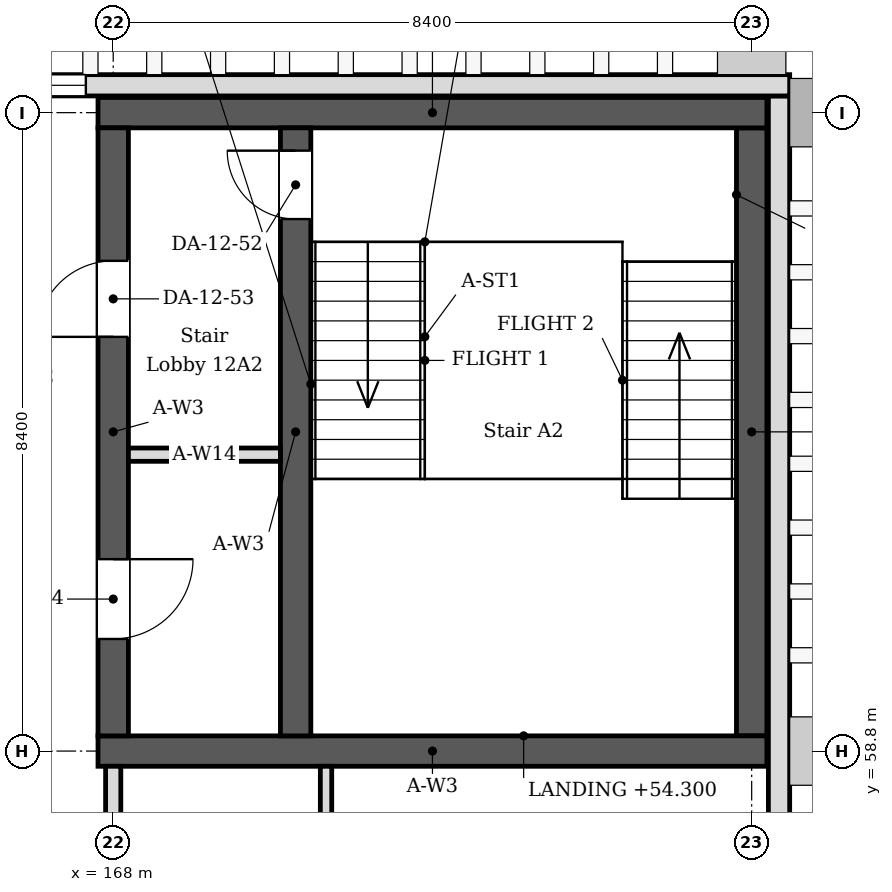
"""IFC4 building model, lengths in metres.
Left out: names, types, materials, properties, quantities, classifications, styles, units other than length and angle.
Written with IfcOpenShell. Run it as: python <this file> out.ifc"""

import sys

from ifc_helpers import new_model, si_unit, direction, frame, frame_2d, origin, place, context, subcontext, project, spatial, rectangle, extrude, element, fill, save


model = new_model("IFC4")
c1 = context("Model", 3, precision=1e-05, world=origin(), true_north=direction((0.0, 1.0)))
c2 = subcontext(c1, "Body", "Model", "MODEL_VIEW")
j1 = project(units=[si_unit("LENGTHUNIT", "METRE"), si_unit("PLANEANGLEUNIT", "RADIAN")], contexts=[c1])
p1 = place(None, origin())
s1 = spatial("IfcSite", under=j1, at=p1, CompositionType="ELEMENT")
p2 = place(p1, origin())
s2 = spatial("IfcBuilding", under=s1, at=p2, CompositionType="ELEMENT")
p3 = place(p2, frame((0.0, 0.0, 52.2)))
s3 = spatial("IfcBuildingStorey", under=s2, at=p3, CompositionType="ELEMENT", Elevation=52.2)
for number, where, z_axis, x_axis in (
    (1, (167.8, 58.8, 0.0), (0.0, 0.0, 1.0), (1.0, 0.0, 0.0)),
    (2, (167.8, 67.2, 0.0), (0.0, 0.0, 1.0), (1.0, 0.0, 0.0)),
):
    element("IfcWall", number, at=place(p3, frame(where, z_axis=z_axis, x_axis=x_axis)), inside=s3, PredefinedType="SOLIDWALL", context=c2, shape_type="SweptSolid", body=[
        extrude(rectangle(XDim=8.8, YDim=0.4, at=frame_2d((4.4, 0.0))), origin(), (0.0, 0.0, 1.0), 4.05),
    ])
p4 = place(p3, frame((168.0, 59.0, 0.0), z_axis=(0.0, 0.0, 1.0), x_axis=(0.0, 1.0, 0.0)))
e3 = element("IfcWall", 3, at=p4, inside=s3, PredefinedType="SOLIDWALL", context=c2, shape_type="SweptSolid", body=[
    extrude(rectangle(XDim=8.0, YDim=0.4, at=frame_2d((4.0, 0.0))), origin(), (0.0, 0.0, 1.0), 4.05),
])
p5 = place(p4, frame((5.25, 0.0, 0.0)))
e4 = element("IfcOpeningElement", 4, at=p5, cuts=e3, PredefinedType="OPENING", context=c2, shape_type="SweptSolid", body=[
    extrude(rectangle(XDim=1.0, YDim=2.1, at=frame_2d((0.5, 1.05))), frame((0.0, 0.21, 0.0), z_axis=(0.0, -1.0, 0.0), x_axis=(1.0, 0.0, 0.0)), (0.0, 0.0, 1.0), 0.42),
])
p6 = place(p4, frame((1.275, 0.0, 0.0)))
e5 = element("IfcOpeningElement", 5, at=p6, cuts=e3, PredefinedType="OPENING", context=c2, shape_type="SweptSolid", body=[
    extrude(rectangle(XDim=1.05, YDim=2.1, at=frame_2d((0.525, 1.05))), frame((0.0, 0.21, 0.0), z_axis=(0.0, -1.0, 0.0), x_axis=(1.0, 0.0, 0.0)), (0.0, 0.0, 1.0), 0.42),
])
p7 = place(p3, frame((176.4, 59.0, 0.0), z_axis=(0.0, 0.0, 1.0), x_axis=(0.0, 1.0, 0.0)))
e6 = element("IfcWall", 6, at=p7, inside=s3, PredefinedType="SOLIDWALL", context=c2, shape_type="SweptSolid", body=[
    extrude(rectangle(XDim=8.0, YDim=0.4, at=frame_2d((4.0, 0.0))), origin(), (0.0, 0.0, 1.0), 4.05),
])
p8 = place(p3, frame((176.76, 24.85, 0.0), z_axis=(0.0, 0.0, 1.0), x_axis=(0.0, 1.0, 0.0)))
e7 = element("IfcWall", 7, at=p8, inside=s3, PredefinedType="SOLIDWALL", context=c2, shape_type="SweptSolid", body=[
    extrude(rectangle(XDim=42.57, YDim=0.28, at=frame_2d((21.285, 0.0))), origin(), (0.0, 0.0, 1.0), 4.05),
])
p9 = place(p8, frame((17.99, 0.0, 0.6)))
e8 = element("IfcOpeningElement", 8, at=p9, cuts=e7, PredefinedType="OPENING", context=c2, shape_type="SweptSolid", body=[
    extrude(rectangle(XDim=2.52, YDim=2.4, at=frame_2d((1.26, 1.2))), frame((0.0, 0.15, 0.0), z_axis=(0.0, -1.0, 0.0), x_axis=(1.0, 0.0, 0.0)), (0.0, 0.0, 1.0), 0.3),
])
p10 = place(p8, frame((22.19, 0.0, 0.6)))
e9 = element("IfcOpeningElement", 9, at=p10, cuts=e7, PredefinedType="OPENING", context=c2, shape_type="SweptSolid", body=[
    extrude(rectangle(XDim=2.52, YDim=2.4, at=frame_2d((1.26, 1.2))), frame((0.0, 0.15, 0.0), z_axis=(0.0, -1.0, 0.0), x_axis=(1.0, 0.0, 0.0)), (0.0, 0.0, 1.0), 0.3),
])
p11 = place(p8, frame((25.97, 0.0, 0.6)))
e10 = element("IfcOpeningElement", 10, at=p11, cuts=e7, PredefinedType="OPENING", context=c2, shape_type="SweptSolid", body=[
    extrude(rectangle(XDim=2.52, YDim=2.4, at=frame_2d((1.26, 1.2))), frame((0.0, 0.15, 0.0), z_axis=(0.0, -1.0, 0.0), x_axis=(1.0, 0.0, 0.0)), (0.0, 0.0, 1.0), 0.3),
])
p12 = place(p8, frame((30.17, 0.0, 0.45)))
e11 = element("IfcOpeningElement", 11, at=p12, cuts=e7, PredefinedType="OPENING", context=c2, shape_type="SweptSolid", body=[
    extrude(rectangle(XDim=2.52, YDim=2.1, at=frame_2d((1.26, 1.05))), frame((0.0, 0.15, 0.0), z_axis=(0.0, -1.0, 0.0), x_axis=(1.0, 0.0, 0.0)), (0.0, 0.0, 1.0), 0.3),
])
p13 = place(p3, frame((156.7, 67.56, 0.0), z_axis=(0.0, 0.0, 1.0), x_axis=(1.0, 0.0, 0.0)))
e12 = element("IfcWall", 12, at=p13, inside=s3, PredefinedType="SOLIDWALL", context=c2, shape_type="SweptSolid", body=[
    extrude(rectangle(XDim=20.2, YDim=0.28, at=frame_2d((10.1, 0.0))), origin(), (0.0, 0.0, 1.0), 4.05),
])
p14 = place(p13, frame((9.26, 0.0, 0.6)))
e13 = element("IfcOpeningElement", 13, at=p14, cuts=e12, PredefinedType="OPENING", context=c2, shape_type="SweptSolid", body=[
    extrude(rectangle(XDim=1.68, YDim=2.4, at=frame_2d((0.84, 1.2))), frame((0.0, 0.15, 0.0), z_axis=(0.0, -1.0, 0.0), x_axis=(1.0, 0.0, 0.0)), (0.0, 0.0, 1.0), 0.3),
])
p15 = place(p13, frame((3.34, 0.0, 0.6)))
e14 = element("IfcOpeningElement", 14, at=p15, cuts=e12, PredefinedType="OPENING", context=c2, shape_type="SweptSolid", body=[
    extrude(rectangle(XDim=2.52, YDim=2.4, at=frame_2d((1.26, 1.2))), frame((0.0, 0.15, 0.0), z_axis=(0.0, -1.0, 0.0), x_axis=(1.0, 0.0, 0.0)), (0.0, 0.0, 1.0), 0.3),
])
p16 = place(p3, frame((170.8, 56.0, 0.0), z_axis=(0.0, 0.0, 1.0), x_axis=(0.0, 1.0, 0.0)))
e15 = element("IfcWall", 15, at=p16, inside=s3, PredefinedType="PARTITIONING", context=c2, shape_type="SweptSolid", body=[
    extrude(rectangle(XDim=2.6, YDim=0.15, at=frame_2d((1.3, 0.0))), origin(), (0.0, 0.0, 1.0), 4.05),
])
p17 = place(p3, frame((168.0, 50.55, 0.0), z_axis=(0.0, 0.0, 1.0), x_axis=(0.0, 1.0, 0.0)))
e16 = element("IfcWall", 16, at=p17, inside=s3, PredefinedType="PARTITIONING", context=c2, shape_type="SweptSolid", body=[
    extrude(rectangle(XDim=8.05, YDim=0.2, at=frame_2d((4.025, 0.0))), origin(), (0.0, 0.0, 1.0), 3.45),
])
p18 = place(p17, frame((2.08, 0.0, 0.0)))
e17 = element("IfcOpeningElement", 17, at=p18, cuts=e16, PredefinedType="OPENING", context=c2, shape_type="SweptSolid", body=[
    extrude(rectangle(XDim=0.9, YDim=2.1, at=frame_2d((0.45, 1.05))), frame((0.0, 0.11, 0.0), z_axis=(0.0, -1.0, 0.0), x_axis=(1.0, 0.0, 0.0)), (0.0, 0.0, 1.0), 0.22),
])
p19 = place(p17, frame((3.755, 0.0, 0.0)))
e18 = element("IfcOpeningElement", 18, at=p19, cuts=e16, PredefinedType="OPENING", context=c2, shape_type="SweptSolid", body=[
    extrude(rectangle(XDim=1.15, YDim=2.1, at=frame_2d((0.575, 1.05))), frame((0.0, 0.11, 0.0), z_axis=(0.0, -1.0, 0.0), x_axis=(1.0, 0.0, 0.0)), (0.0, 0.0, 1.0), 0.22),
])
p20 = place(p3, frame((170.4, 59.0, 0.0), z_axis=(0.0, 0.0, 1.0), x_axis=(0.0, 1.0, 0.0)))
e19 = element("IfcWall", 19, at=p20, inside=s3, PredefinedType="SOLIDWALL", context=c2, shape_type="SweptSolid", body=[
    extrude(rectangle(XDim=8.0, YDim=0.4, at=frame_2d((4.0, 0.0))), origin(), (0.0, 0.0, 1.0), 4.05),
])
p21 = place(p20, frame((6.8, 0.0, 0.0)))
e20 = element("IfcOpeningElement", 20, at=p21, cuts=e19, PredefinedType="OPENING", context=c2, shape_type="SweptSolid", body=[
    extrude(rectangle(XDim=0.9, YDim=2.1, at=frame_2d((0.45, 1.05))), frame((0.0, 0.21, 0.0), z_axis=(0.0, -1.0, 0.0), x_axis=(1.0, 0.0, 0.0)), (0.0, 0.0, 1.0), 0.42),
])
p22 = place(p3, frame((168.2, 62.7, 0.0), z_axis=(0.0, 0.0, 1.0), x_axis=(1.0, 0.0, 0.0)))
e21 = element("IfcWall", 21, at=p22, inside=s3, PredefinedType="PARTITIONING", context=c2, shape_type="SweptSolid", body=[
    extrude(rectangle(XDim=2.0, YDim=0.175, at=frame_2d((1.0, 0.0))), origin(), (0.0, 0.0, 1.0), 4.05),
])
p23 = place(p14, origin())
e22 = element("IfcWindow", 22, at=p23, inside=s3, PartitioningType="SINGLE_PANEL", PredefinedType="WINDOW", context=c2, shape_type="SweptSolid", body=[
    extrude(rectangle(XDim=1.68, YDim=2.4, at=frame_2d((0.84, 1.2))), frame((0.0, 0.03, 0.0), z_axis=(0.0, -1.0, 0.0), x_axis=(1.0, 0.0, 0.0)), (0.0, 0.0, 1.0), 0.06),
])
fill(e13, e22)
p24 = place(p21, origin())
e23 = element("IfcDoor", 23, at=p24, inside=s3, OperationType="SINGLE_SWING_RIGHT", PredefinedType="DOOR", context=c2, shape_type="SweptSolid", body=[
    extrude(rectangle(XDim=0.9, YDim=2.1, at=frame_2d((0.45, 1.05))), frame((0.0, 0.025, 0.0), z_axis=(0.0, -1.0, 0.0), x_axis=(1.0, 0.0, 0.0)), (0.0, 0.0, 1.0), 0.05),
])
fill(e20, e23)
p25 = place(p5, origin())
e24 = element("IfcDoor", 24, at=p25, inside=s3, OperationType="SINGLE_SWING_LEFT", PredefinedType="DOOR", context=c2, shape_type="SweptSolid", body=[
    extrude(rectangle(XDim=1.0, YDim=2.1, at=frame_2d((0.5, 1.05))), frame((0.0, 0.025, 0.0), z_axis=(0.0, -1.0, 0.0), x_axis=(1.0, 0.0, 0.0)), (0.0, 0.0, 1.0), 0.05),
])
fill(e4, e24)
p26 = place(p6, origin())
e25 = element("IfcDoor", 25, at=p26, inside=s3, OperationType="SINGLE_SWING_RIGHT", PredefinedType="DOOR", context=c2, shape_type="SweptSolid", body=[
    extrude(rectangle(XDim=1.05, YDim=2.1, at=frame_2d((0.525, 1.05))), frame((0.0, 0.025, 0.0), z_axis=(0.0, -1.0, 0.0), x_axis=(1.0, 0.0, 0.0)), (0.0, 0.0, 1.0), 0.05),
])
fill(e5, e25)
save(model, sys.argv[1])
